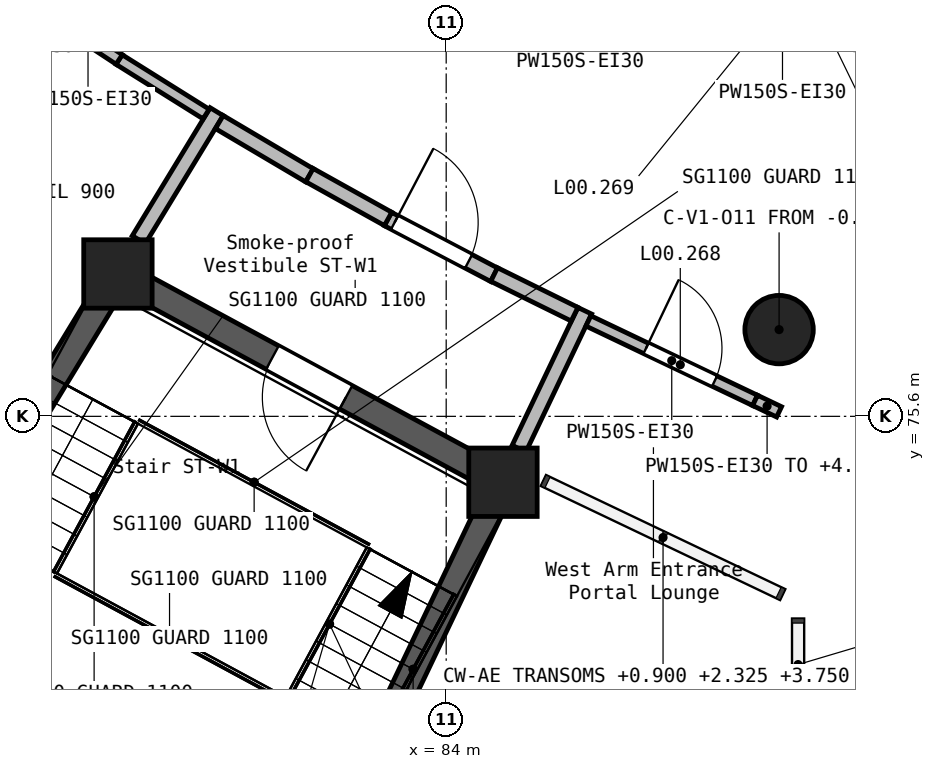
"""IFC4 building model, lengths in metres.
Left out: names, types, materials, properties, quantities, classifications, styles, units other than length and angle.
Written with IfcOpenShell. Run it as: python <this file> out.ifc"""

import sys

from ifc_helpers import new_model, si_unit, direction, frame, frame_2d, origin, origin_2d, place, context, subcontext, project, spatial, rectangle, circle, extrude, element, fill, save


model = new_model("IFC4")
c1 = context("Model", 3, precision=1e-05, world=origin(), true_north=direction((0.0, 1.0)))
c2 = subcontext(c1, "Body", "Model", "MODEL_VIEW")
j1 = project(units=[si_unit("LENGTHUNIT", "METRE"), si_unit("PLANEANGLEUNIT", "RADIAN")], contexts=[c1])
p1 = place(None, origin())
s1 = spatial("IfcSite", under=j1, at=p1, CompositionType="ELEMENT")
p2 = place(p1, origin())
s2 = spatial("IfcBuilding", under=s1, at=p2, CompositionType="ELEMENT")
p3 = place(p2, origin())
s3 = spatial("IfcBuildingStorey", under=s2, at=p3, CompositionType="ELEMENT", Elevation=0.0)
for number, where, z_axis, x_axis in (
    (1, (79.681, 77.473, -0.3), (0.0, 0.0, 1.0), (1.0, 0.0, 0.0)),
    (2, (84.747, 74.733, -0.3), (0.0, 0.0, 1.0), (1.0, 0.0, 0.0)),
):
    element("IfcColumn", number, at=place(p3, frame(where, z_axis=z_axis, x_axis=x_axis)), inside=s3, PredefinedType="COLUMN", context=c2, shape_type="SweptSolid", body=[
        extrude(rectangle(XDim=0.9, YDim=0.9, at=origin_2d()), origin(), (0.0, 0.0, 1.0), 5.7),
    ])
p4 = place(p3, frame((88.38, 76.741, -0.3), z_axis=(0.0, 0.0, 1.0), x_axis=(1.0, 0.0, 0.0)))
e3 = element("IfcColumn", 3, at=p4, inside=s3, PredefinedType="COLUMN", context=c2, shape_type="SweptSolid", body=[
    extrude(circle(Radius=0.45, at=origin_2d()), origin(), (0.0, 0.0, 1.0), 5.7),
])
p5 = place(p3, frame((75.848, 71.173, -0.3), z_axis=(0.0, 0.0, 1.0), x_axis=(0.51973149438, 0.854329663391, 0.0)))
e4 = element("IfcWall", 4, at=p5, inside=s3, PredefinedType="SHEAR", context=c2, shape_type="SweptSolid", body=[
    extrude(rectangle(XDim=7.55, YDim=0.35, at=frame_2d((3.775, 0.0))), origin(), (0.0, 0.0, 1.0), 5.7),
])
p6 = place(p3, frame((81.572, 68.077, -0.3), z_axis=(0.0, 0.0, 1.0), x_axis=(0.430592498036, 0.90254645345, 0.0)))
e5 = element("IfcWall", 5, at=p6, inside=s3, PredefinedType="SHEAR", context=c2, shape_type="SweptSolid", body=[
    extrude(rectangle(XDim=7.55, YDim=0.35, at=frame_2d((3.775, 0.0))), origin(), (0.0, 0.0, 1.0), 5.7),
])
p7 = place(p3, frame((84.593, 74.816, -0.3), z_axis=(0.0, 0.0, 1.0), x_axis=(-0.879585553739, 0.475740742058, 0.0)))
e6 = element("IfcWall", 6, at=p7, inside=s3, PredefinedType="SHEAR", context=c2, shape_type="SweptSolid", body=[
    extrude(rectangle(XDim=5.409, YDim=0.35, at=frame_2d((2.705, 0.0))), origin(), (0.0, 0.0, 1.0), 5.7),
])
p8 = place(p7, frame((2.174, 0.0, 0.3)))
e7 = element("IfcOpeningElement", 7, at=p8, cuts=e6, PredefinedType="OPENING", context=c2, shape_type="SweptSolid", body=[
    extrude(rectangle(XDim=1.1, YDim=2.1, at=frame_2d((0.55, 1.05))), frame((0.0, 0.185, 0.0), z_axis=(0.0, -1.0, 0.0), x_axis=(1.0, 0.0, 0.0)), (0.0, 0.0, 1.0), 0.37),
])
p9 = place(p3, frame((84.958, 75.175, 0.0), z_axis=(0.0, 0.0, 1.0), x_axis=(0.430419231225, 0.902629096247, 0.0)))
e8 = element("IfcWall", 8, at=p9, inside=s3, PredefinedType="SOLIDWALL", context=c2, shape_type="SweptSolid", body=[
    extrude(rectangle(XDim=2.01, YDim=0.2, at=frame_2d((1.005, 0.0))), origin(), (0.0, 0.0, 1.0), 5.05),
])
p10 = place(p3, frame((79.955, 77.924, 0.0), z_axis=(0.0, 0.0, 1.0), x_axis=(0.519675881268, 0.85436349315, 0.0)))
e9 = element("IfcWall", 9, at=p10, inside=s3, PredefinedType="SOLIDWALL", context=c2, shape_type="SweptSolid", body=[
    extrude(rectangle(XDim=1.972, YDim=0.2, at=frame_2d((0.986, 0.0))), origin(), (0.0, 0.0, 1.0), 5.05),
])
p11 = place(p3, frame((83.232, 78.197, 0.0), z_axis=(0.0, 0.0, 1.0), x_axis=(0.885510751813, -0.464618885134, 0.0)))
e10 = element("IfcWall", 10, at=p11, inside=s3, PredefinedType="SOLIDWALL", context=c2, shape_type="SweptSolid", body=[
    extrude(rectangle(XDim=1.58, YDim=0.2, at=frame_2d((0.79, 0.0))), origin(), (0.0, 0.0, 1.0), 5.05),
])
p12 = place(p11, frame((0.1, 0.0, 0.0)))
e11 = element("IfcOpeningElement", 11, at=p12, cuts=e10, PredefinedType="OPENING", context=c2, shape_type="SweptSolid", body=[
    extrude(rectangle(XDim=1.1, YDim=2.1, at=frame_2d((0.55, 1.05))), frame((0.0, 0.11, 0.0), z_axis=(0.0, -1.0, 0.0), x_axis=(1.0, 0.0, 0.0)), (0.0, 0.0, 1.0), 0.22),
])
p13 = place(p3, frame((81.015, 79.471, 0.0), z_axis=(0.0, 0.0, 1.0), x_axis=(0.860926528214, -0.508729312127, 0.0)))
e12 = element("IfcWall", 12, at=p13, inside=s3, PredefinedType="SOLIDWALL", context=c2, shape_type="SweptSolid", body=[
    extrude(rectangle(XDim=1.379, YDim=0.2, at=frame_2d((0.689, 0.0))), origin(), (0.0, 0.0, 1.0), 5.05),
])
p14 = place(p3, frame((84.631, 77.466, 0.0), z_axis=(0.0, 0.0, 1.0), x_axis=(0.896895597342, -0.442242340203, 0.0)))
e13 = element("IfcWall", 13, at=p14, inside=s3, PredefinedType="SOLIDWALL", context=c2, shape_type="SweptSolid", body=[
    extrude(rectangle(XDim=1.18, YDim=0.2, at=frame_2d((0.59, 0.0))), origin(), (0.0, 0.0, 1.0), 5.05),
])
p15 = place(p3, frame((82.201, 78.774, 0.0), z_axis=(0.0, 0.0, 1.0), x_axis=(0.873621822139, -0.486605499232, 0.0)))
e14 = element("IfcWall", 14, at=p15, inside=s3, PredefinedType="SOLIDWALL", context=c2, shape_type="SweptSolid", body=[
    extrude(rectangle(XDim=1.184, YDim=0.2, at=frame_2d((0.592, 0.0))), origin(), (0.0, 0.0, 1.0), 5.05),
])
p16 = place(p3, frame((85.871, 76.855, 0.0), z_axis=(0.0, 0.0, 1.0), x_axis=(0.902650527198, -0.43037428565, 0.0)))
e15 = element("IfcWall", 15, at=p16, inside=s3, PredefinedType="PARTITIONING", context=c2, shape_type="SweptSolid", body=[
    extrude(rectangle(XDim=2.43, YDim=0.15, at=frame_2d((1.215, 0.0))), origin(), (0.0, 0.0, 1.0), 5.05),
])
p17 = place(p16, frame((0.839, 0.0, 0.0)))
e16 = element("IfcOpeningElement", 16, at=p17, cuts=e15, PredefinedType="OPENING", context=c2, shape_type="SweptSolid", body=[
    extrude(rectangle(XDim=1.0, YDim=2.1, at=frame_2d((0.5, 1.05))), frame((0.0, 0.085, 0.0), z_axis=(0.0, -1.0, 0.0), x_axis=(1.0, 0.0, 0.0)), (0.0, 0.0, 1.0), 0.17),
])
p18 = place(p3, frame((88.064, 75.81, 0.0), z_axis=(0.0, 0.0, 1.0), x_axis=(0.902240472816, -0.431233265429, 0.0)))
e17 = element("IfcWall", 17, at=p18, inside=s3, PredefinedType="PARTITIONING", context=c2, shape_type="SweptSolid", body=[
    extrude(rectangle(XDim=0.35, YDim=0.15, at=frame_2d((0.175, 0.0))), origin(), (0.0, 0.0, 1.0), 4.28),
])
p19 = place(p3, frame((79.695, 80.295, 0.0), z_axis=(0.0, 0.0, 1.0), x_axis=(0.847541618724, -0.530728936964, 0.0)))
e18 = element("IfcWall", 18, at=p19, inside=s3, PredefinedType="PARTITIONING", context=c2, shape_type="SweptSolid", body=[
    extrude(rectangle(XDim=1.353, YDim=0.15, at=frame_2d((0.676, 0.0))), origin(), (0.0, 0.0, 1.0), 5.05),
])
p20 = place(p3, frame((78.877, 80.836, 0.0), z_axis=(0.0, 0.0, 1.0), x_axis=(0.835209839134, -0.549931381733, 0.0)))
e19 = element("IfcWall", 19, at=p20, inside=s3, PredefinedType="PARTITIONING", context=c2, shape_type="SweptSolid", body=[
    extrude(rectangle(XDim=0.982, YDim=0.15, at=frame_2d((0.491, 0.0))), origin(), (0.0, 0.0, 1.0), 5.05),
])
p21 = place(p17, frame((1.0, 0.0, 0.0), z_axis=(0.0, 0.0, 1.0), x_axis=(-1.0, 0.0, 0.0)))
e20 = element("IfcDoor", 20, at=p21, inside=s3, OperationType="SINGLE_SWING_LEFT", PredefinedType="DOOR", context=c2, shape_type="SweptSolid", body=[
    extrude(rectangle(XDim=1.0, YDim=2.1, at=frame_2d((0.5, 1.05))), frame((0.0, 0.025, 0.0), z_axis=(0.0, -1.0, 0.0), x_axis=(1.0, 0.0, 0.0)), (0.0, 0.0, 1.0), 0.05),
])
fill(e16, e20)
p22 = place(p8, origin())
e21 = element("IfcDoor", 21, at=p22, inside=s3, OperationType="SINGLE_SWING_RIGHT", PredefinedType="DOOR", context=c2, shape_type="SweptSolid", body=[
    extrude(rectangle(XDim=1.1, YDim=2.1, at=frame_2d((0.55, 1.05))), frame((0.0, 0.025, 0.0), z_axis=(0.0, -1.0, 0.0), x_axis=(1.0, 0.0, 0.0)), (0.0, 0.0, 1.0), 0.05),
])
fill(e7, e21)
p23 = place(p12, frame((1.1, 0.0, 0.0), z_axis=(0.0, 0.0, 1.0), x_axis=(-1.0, 0.0, 0.0)))
e22 = element("IfcDoor", 22, at=p23, inside=s3, OperationType="SINGLE_SWING_RIGHT", PredefinedType="DOOR", context=c2, shape_type="SweptSolid", body=[
    extrude(rectangle(XDim=1.1, YDim=2.1, at=frame_2d((0.55, 1.05))), frame((0.0, 0.025, 0.0), z_axis=(0.0, -1.0, 0.0), x_axis=(1.0, 0.0, 0.0)), (0.0, 0.0, 1.0), 0.05),
])
fill(e11, e22)
save(model, sys.argv[1])
